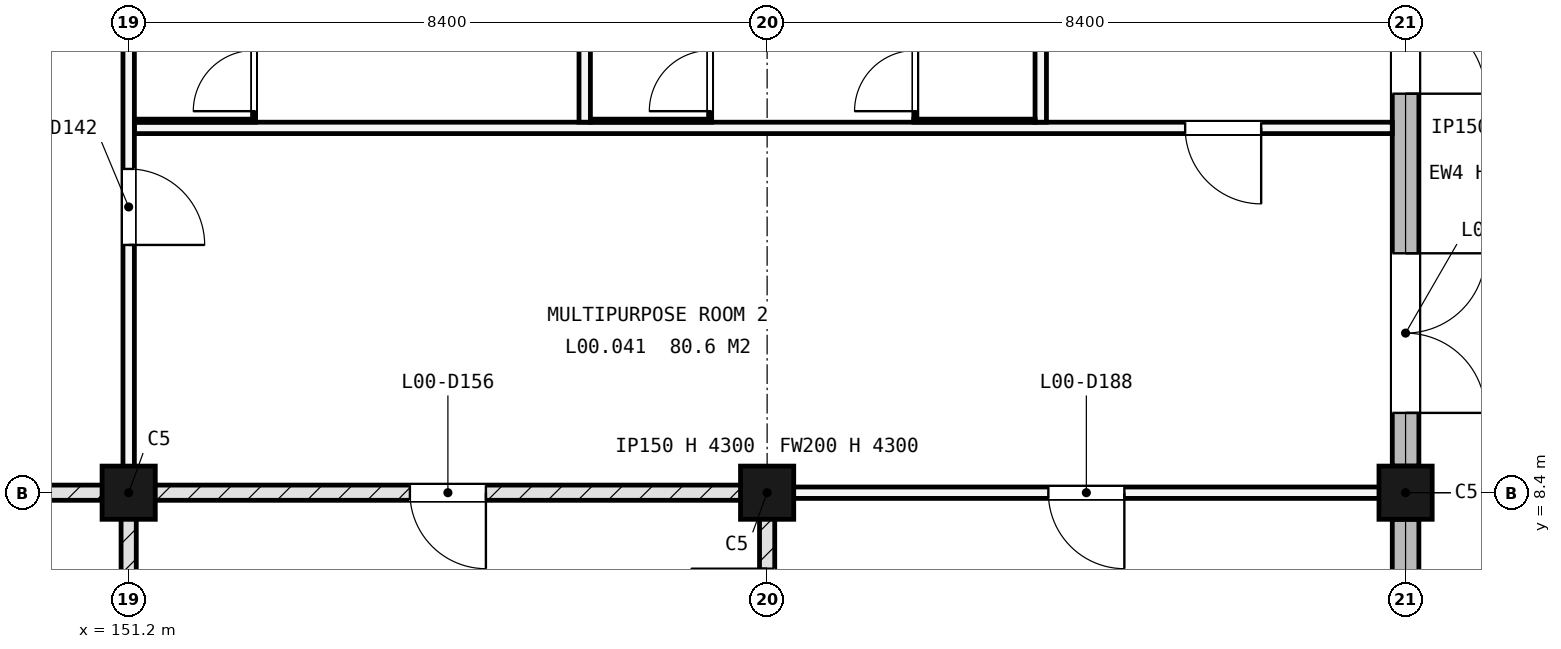
"""IFC4 building model, lengths in metres.
Left out: names, types, materials, properties, quantities, classifications, styles, units other than length and angle.
Written with IfcOpenShell. Run it as: python <this file> out.ifc"""

import sys

from ifc_helpers import new_model, si_unit, direction, frame, frame_2d, origin, origin_2d, place, context, subcontext, project, spatial, rectangle, extrude, element, fill, save


model = new_model("IFC4")
c1 = context("Model", 3, precision=1e-05, world=origin(), true_north=direction((0.0, 1.0)))
c2 = subcontext(c1, "Body", "Model", "MODEL_VIEW")
j1 = project(units=[si_unit("LENGTHUNIT", "METRE"), si_unit("PLANEANGLEUNIT", "RADIAN")], contexts=[c1])
p1 = place(None, origin())
s1 = spatial("IfcSite", under=j1, at=p1, CompositionType="ELEMENT")
p2 = place(p1, origin())
s2 = spatial("IfcBuilding", under=s1, at=p2, CompositionType="ELEMENT")
p3 = place(p2, origin())
s3 = spatial("IfcBuildingStorey", under=s2, at=p3, CompositionType="ELEMENT", Elevation=0.0)
for number, where, z_axis, x_axis in (
    (1, (151.2, 8.4, -0.3), (0.0, 0.0, 1.0), (1.0, 0.0, 0.0)),
    (2, (159.6, 8.4, -0.3), (0.0, 0.0, 1.0), (1.0, 0.0, 0.0)),
    (3, (168.0, 8.4, -0.3), (0.0, 0.0, 1.0), (1.0, 0.0, 0.0)),
):
    element("IfcColumn", number, at=place(p3, frame(where, z_axis=z_axis, x_axis=x_axis)), inside=s3, PredefinedType="COLUMN", context=c2, shape_type="SweptSolid", body=[
        extrude(rectangle(XDim=0.7, YDim=0.7, at=origin_2d()), origin(), (0.0, 0.0, 1.0), 5.4),
    ])
p4 = place(p3, frame((168.0, 0.225, 0.0), z_axis=(0.0, 0.0, 1.0), x_axis=(0.0, 1.0, 0.0)))
e4 = element("IfcWall", 4, at=p4, inside=s3, PredefinedType="STANDARD", context=c2, shape_type="SweptSolid", body=[
    extrude(rectangle(XDim=7.825, YDim=0.35, at=frame_2d((3.913, 0.0))), origin(), (0.0, 0.0, 1.0), 5.1),
])
p5 = place(p4, frame((4.875, 0.0, 0.0), z_axis=(0.0, 0.0, 1.0), x_axis=(-1.0, 0.0, 0.0)))
e5 = element("IfcOpeningElement", 5, at=p5, cuts=e4, PredefinedType="OPENING", context=c2, shape_type="SweptSolid", body=[
    extrude(rectangle(XDim=2.4, YDim=2.2, at=frame_2d((1.2, 1.1))), frame((0.0, 0.185, 0.0), z_axis=(0.0, -1.0, 0.0), x_axis=(1.0, 0.0, 0.0)), (0.0, 0.0, 1.0), 0.37),
])
p6 = place(p3, frame((168.0, 8.75, 0.0), z_axis=(0.0, 0.0, 1.0), x_axis=(0.0, 1.0, 0.0)))
e6 = element("IfcWall", 6, at=p6, inside=s3, PredefinedType="STANDARD", context=c2, shape_type="SweptSolid", body=[
    extrude(rectangle(XDim=7.7, YDim=0.35, at=frame_2d((3.85, 0.0))), origin(), (0.0, 0.0, 1.0), 4.45),
])
p7 = place(p6, frame((2.8, 0.0, 0.0), z_axis=(0.0, 0.0, 1.0), x_axis=(-1.0, 0.0, 0.0)))
e7 = element("IfcOpeningElement", 7, at=p7, cuts=e6, PredefinedType="OPENING", context=c2, shape_type="SweptSolid", body=[
    extrude(rectangle(XDim=2.1, YDim=2.2, at=frame_2d((1.05, 1.1))), frame((0.0, 0.185, 0.0), z_axis=(0.0, -1.0, 0.0), x_axis=(1.0, 0.0, 0.0)), (0.0, 0.0, 1.0), 0.37),
])
p8 = place(p6, frame((7.0, 0.0, 0.0), z_axis=(0.0, 0.0, 1.0), x_axis=(-1.0, 0.0, 0.0)))
e8 = element("IfcOpeningElement", 8, at=p8, cuts=e6, PredefinedType="OPENING", context=c2, shape_type="SweptSolid", body=[
    extrude(rectangle(XDim=2.1, YDim=2.2, at=frame_2d((1.05, 1.1))), frame((0.0, 0.185, 0.0), z_axis=(0.0, -1.0, 0.0), x_axis=(1.0, 0.0, 0.0)), (0.0, 0.0, 1.0), 0.37),
])
p9 = place(p3, frame((117.6, 8.4, 0.0), z_axis=(0.0, 0.0, 1.0), x_axis=(1.0, 0.0, 0.0)))
e9 = element("IfcWall", 9, at=p9, inside=s3, PredefinedType="SOLIDWALL", context=c2, shape_type="SweptSolid", body=[
    extrude(rectangle(XDim=42.0, YDim=0.2, at=frame_2d((21.0, 0.0))), origin(), (0.0, 0.0, 1.0), 4.3),
])
p10 = place(p9, frame((37.3, 0.0, 0.0)))
e10 = element("IfcOpeningElement", 10, at=p10, cuts=e9, PredefinedType="OPENING", context=c2, shape_type="SweptSolid", body=[
    extrude(rectangle(XDim=1.0, YDim=2.1, at=frame_2d((0.5, 1.05))), frame((0.0, 0.11, 0.0), z_axis=(0.0, -1.0, 0.0), x_axis=(1.0, 0.0, 0.0)), (0.0, 0.0, 1.0), 0.22),
])
p11 = place(p3, frame((159.6, 8.4, 0.0), z_axis=(0.0, 0.0, 1.0), x_axis=(1.0, 0.0, 0.0)))
e11 = element("IfcWall", 11, at=p11, inside=s3, PredefinedType="PARTITIONING", context=c2, shape_type="SweptSolid", body=[
    extrude(rectangle(XDim=8.4, YDim=0.15, at=frame_2d((4.2, 0.0))), origin(), (0.0, 0.0, 1.0), 4.3),
])
p12 = place(p11, frame((3.7, 0.0, 0.0)))
e12 = element("IfcOpeningElement", 12, at=p12, cuts=e11, PredefinedType="OPENING", context=c2, shape_type="SweptSolid", body=[
    extrude(rectangle(XDim=1.0, YDim=2.1, at=frame_2d((0.5, 1.05))), frame((0.0, 0.085, 0.0), z_axis=(0.0, -1.0, 0.0), x_axis=(1.0, 0.0, 0.0)), (0.0, 0.0, 1.0), 0.17),
])
p13 = place(p3, frame((151.275, 13.2, 0.0), z_axis=(0.0, 0.0, 1.0), x_axis=(1.0, 0.0, 0.0)))
e13 = element("IfcWall", 13, at=p13, inside=s3, PredefinedType="PARTITIONING", context=c2, shape_type="SweptSolid", body=[
    extrude(rectangle(XDim=16.55, YDim=0.15, at=frame_2d((8.275, 0.0))), origin(), (0.0, 0.0, 1.0), 5.1),
])
p14 = place(p13, frame((13.825, 0.0, 0.0)))
e14 = element("IfcOpeningElement", 14, at=p14, cuts=e13, PredefinedType="OPENING", context=c2, shape_type="SweptSolid", body=[
    extrude(rectangle(XDim=1.0, YDim=2.1, at=frame_2d((0.5, 1.05))), frame((0.0, 0.085, 0.0), z_axis=(0.0, -1.0, 0.0), x_axis=(1.0, 0.0, 0.0)), (0.0, 0.0, 1.0), 0.17),
])
p15 = place(p3, frame((151.2, 0.225, 0.0), z_axis=(0.0, 0.0, 1.0), x_axis=(0.0, 1.0, 0.0)))
e15 = element("IfcWall", 15, at=p15, inside=s3, PredefinedType="SOLIDWALL", context=c2, shape_type="SweptSolid", body=[
    extrude(rectangle(XDim=8.075, YDim=0.2, at=frame_2d((4.038, 0.0))), origin(), (0.0, 0.0, 1.0), 4.3),
])
p16 = place(p15, frame((3.325, 0.0, 0.0)))
e16 = element("IfcOpeningElement", 16, at=p16, cuts=e15, PredefinedType="OPENING", context=c2, shape_type="SweptSolid", body=[
    extrude(rectangle(XDim=1.3, YDim=2.1, at=frame_2d((0.65, 1.05))), frame((0.0, 0.11, 0.0), z_axis=(0.0, -1.0, 0.0), x_axis=(1.0, 0.0, 0.0)), (0.0, 0.0, 1.0), 0.22),
])
p17 = place(p3, frame((151.2, 8.5, 0.0), z_axis=(0.0, 0.0, 1.0), x_axis=(0.0, 1.0, 0.0)))
e17 = element("IfcWall", 17, at=p17, inside=s3, PredefinedType="PARTITIONING", context=c2, shape_type="SweptSolid", body=[
    extrude(rectangle(XDim=16.625, YDim=0.15, at=frame_2d((8.312, 0.0))), origin(), (0.0, 0.0, 1.0), 4.3),
])
p18 = place(p17, frame((3.16, 0.0, 0.0)))
e18 = element("IfcOpeningElement", 18, at=p18, cuts=e17, PredefinedType="OPENING", context=c2, shape_type="SweptSolid", body=[
    extrude(rectangle(XDim=1.0, YDim=2.1, at=frame_2d((0.5, 1.05))), frame((0.0, 0.085, 0.0), z_axis=(0.0, -1.0, 0.0), x_axis=(1.0, 0.0, 0.0)), (0.0, 0.0, 1.0), 0.17),
])
p19 = place(p3, frame((157.2, 13.275, 0.0), z_axis=(0.0, 0.0, 1.0), x_axis=(0.0, 1.0, 0.0)))
e19 = element("IfcWall", 19, at=p19, inside=s3, PredefinedType="PARTITIONING", context=c2, shape_type="SweptSolid", body=[
    extrude(rectangle(XDim=9.45, YDim=0.15, at=frame_2d((4.725, 0.0))), origin(), (0.0, 0.0, 1.0), 5.1),
])
p20 = place(p3, frame((159.6, 5.3, 0.0), z_axis=(0.0, 0.0, 1.0), x_axis=(0.0, 1.0, 0.0)))
e20 = element("IfcWall", 20, at=p20, inside=s3, PredefinedType="SOLIDWALL", context=c2, shape_type="SweptSolid", body=[
    extrude(rectangle(XDim=3.0, YDim=0.2, at=frame_2d((1.5, 0.0))), origin(), (0.0, 0.0, 1.0), 5.1),
])
p21 = place(p20, frame((1.1, 0.0, 0.0)))
e21 = element("IfcOpeningElement", 21, at=p21, cuts=e20, PredefinedType="OPENING", context=c2, shape_type="SweptSolid", body=[
    extrude(rectangle(XDim=1.0, YDim=2.1, at=frame_2d((0.5, 1.05))), frame((0.0, 0.11, 0.0), z_axis=(0.0, -1.0, 0.0), x_axis=(1.0, 0.0, 0.0)), (0.0, 0.0, 1.0), 0.22),
])
p22 = place(p3, frame((163.2, 13.275, 0.0), z_axis=(0.0, 0.0, 1.0), x_axis=(0.0, 1.0, 0.0)))
e22 = element("IfcWall", 22, at=p22, inside=s3, PredefinedType="PARTITIONING", context=c2, shape_type="SweptSolid", body=[
    extrude(rectangle(XDim=9.45, YDim=0.15, at=frame_2d((4.725, 0.0))), origin(), (0.0, 0.0, 1.0), 5.1),
])
p23 = place(p3, frame((151.275, 13.295, 0.0), z_axis=(0.0, 0.0, 1.0), x_axis=(1.0, 0.0, 0.0)))
e23 = element("IfcWall", 23, at=p23, inside=s3, PredefinedType="PARTITIONING", context=c2, shape_type="SweptSolid", body=[
    extrude(rectangle(XDim=1.595, YDim=0.04, at=frame_2d((0.798, 0.0))), origin(), (0.0, 0.0, 1.0), 2.0),
])
p24 = place(p3, frame((152.85, 13.315, 0.0), z_axis=(0.0, 0.0, 1.0), x_axis=(0.0, 1.0, 0.0)))
e24 = element("IfcWall", 24, at=p24, inside=s3, PredefinedType="PARTITIONING", context=c2, shape_type="SweptSolid", body=[
    extrude(rectangle(XDim=0.955, YDim=0.04, at=frame_2d((0.478, 0.0))), origin(), (0.0, 0.0, 1.0), 2.0),
])
p25 = place(p24, frame((0.105, 0.0, 0.0)))
e25 = element("IfcOpeningElement", 25, at=p25, cuts=e24, PredefinedType="OPENING", context=c2, shape_type="SweptSolid", body=[
    extrude(rectangle(XDim=0.8, YDim=2.0, at=frame_2d((0.4, 1.0))), frame((0.0, 0.03, 0.0), z_axis=(0.0, -1.0, 0.0), x_axis=(1.0, 0.0, 0.0)), (0.0, 0.0, 1.0), 0.06),
])
p26 = place(p3, frame((157.275, 13.295, 0.0), z_axis=(0.0, 0.0, 1.0), x_axis=(1.0, 0.0, 0.0)))
e26 = element("IfcWall", 26, at=p26, inside=s3, PredefinedType="PARTITIONING", context=c2, shape_type="SweptSolid", body=[
    extrude(rectangle(XDim=1.595, YDim=0.04, at=frame_2d((0.798, 0.0))), origin(), (0.0, 0.0, 1.0), 2.0),
])
p27 = place(p3, frame((158.85, 13.315, 0.0), z_axis=(0.0, 0.0, 1.0), x_axis=(0.0, 1.0, 0.0)))
e27 = element("IfcWall", 27, at=p27, inside=s3, PredefinedType="PARTITIONING", context=c2, shape_type="SweptSolid", body=[
    extrude(rectangle(XDim=0.955, YDim=0.04, at=frame_2d((0.478, 0.0))), origin(), (0.0, 0.0, 1.0), 2.0),
])
p28 = place(p27, frame((0.105, 0.0, 0.0)))
e28 = element("IfcOpeningElement", 28, at=p28, cuts=e27, PredefinedType="OPENING", context=c2, shape_type="SweptSolid", body=[
    extrude(rectangle(XDim=0.8, YDim=2.0, at=frame_2d((0.4, 1.0))), frame((0.0, 0.03, 0.0), z_axis=(0.0, -1.0, 0.0), x_axis=(1.0, 0.0, 0.0)), (0.0, 0.0, 1.0), 0.06),
])
p29 = place(p3, frame((163.125, 13.295, 0.0), z_axis=(0.0, 0.0, 1.0), x_axis=(-1.0, 0.0, 0.0)))
e29 = element("IfcWall", 29, at=p29, inside=s3, PredefinedType="PARTITIONING", context=c2, shape_type="SweptSolid", body=[
    extrude(rectangle(XDim=1.595, YDim=0.04, at=frame_2d((0.797, 0.0))), origin(), (0.0, 0.0, 1.0), 2.0),
])
p30 = place(p3, frame((161.55, 13.315, 0.0), z_axis=(0.0, 0.0, 1.0), x_axis=(0.0, 1.0, 0.0)))
e30 = element("IfcWall", 30, at=p30, inside=s3, PredefinedType="PARTITIONING", context=c2, shape_type="SweptSolid", body=[
    extrude(rectangle(XDim=0.955, YDim=0.04, at=frame_2d((0.478, 0.0))), origin(), (0.0, 0.0, 1.0), 2.0),
])
p31 = place(p30, frame((0.105, 0.0, 0.0)))
e31 = element("IfcOpeningElement", 31, at=p31, cuts=e30, PredefinedType="OPENING", context=c2, shape_type="SweptSolid", body=[
    extrude(rectangle(XDim=0.8, YDim=2.0, at=frame_2d((0.4, 1.0))), frame((0.0, 0.03, 0.0), z_axis=(0.0, -1.0, 0.0), x_axis=(1.0, 0.0, 0.0)), (0.0, 0.0, 1.0), 0.06),
])
p32 = place(p7, origin())
e32 = element("IfcDoor", 32, at=p32, inside=s3, OperationType="SINGLE_SWING_LEFT", PredefinedType="DOOR", context=c2, shape_type="SweptSolid", body=[
    extrude(rectangle(XDim=2.1, YDim=0.013, at=frame_2d((1.05, 0.007))), frame((0.0, 0.115, 0.0), z_axis=(0.0, -1.0, 0.0), x_axis=(1.0, 0.0, 0.0)), (0.0, 0.0, 1.0), 0.23),
    extrude(rectangle(XDim=0.075, YDim=2.112, at=frame_2d((0.038, 1.069))), frame((0.0, 0.125, 0.0), z_axis=(0.0, -1.0, 0.0), x_axis=(1.0, 0.0, 0.0)), (0.0, 0.0, 1.0), 0.25),
    extrude(rectangle(XDim=0.075, YDim=2.112, at=frame_2d((2.062, 1.069))), frame((0.0, 0.125, 0.0), z_axis=(0.0, -1.0, 0.0), x_axis=(1.0, 0.0, 0.0)), (0.0, 0.0, 1.0), 0.25),
    extrude(rectangle(XDim=2.1, YDim=0.075, at=frame_2d((1.05, 2.163))), frame((0.0, 0.115, 0.0), z_axis=(0.0, -1.0, 0.0), x_axis=(1.0, 0.0, 0.0)), (0.0, 0.0, 1.0), 0.23),
    extrude(rectangle(XDim=1.95, YDim=0.3, at=frame_2d((1.05, 0.163))), frame((0.0, 0.02, 0.0), z_axis=(0.0, -1.0, 0.0), x_axis=(1.0, 0.0, 0.0)), (0.0, 0.0, 1.0), 0.04),
    extrude(rectangle(XDim=1.95, YDim=0.12, at=frame_2d((1.05, 2.065))), frame((0.0, 0.02, 0.0), z_axis=(0.0, -1.0, 0.0), x_axis=(1.0, 0.0, 0.0)), (0.0, 0.0, 1.0), 0.04),
    extrude(rectangle(XDim=0.09, YDim=1.692, at=frame_2d((0.12, 1.159))), frame((0.0, 0.025, 0.0), z_axis=(0.0, -1.0, 0.0), x_axis=(1.0, 0.0, 0.0)), (0.0, 0.0, 1.0), 0.05),
    extrude(rectangle(XDim=0.18, YDim=1.692, at=frame_2d((1.05, 1.159))), frame((0.0, 0.025, 0.0), z_axis=(0.0, -1.0, 0.0), x_axis=(1.0, 0.0, 0.0)), (0.0, 0.0, 1.0), 0.05),
    extrude(rectangle(XDim=0.09, YDim=1.692, at=frame_2d((1.98, 1.159))), frame((0.0, 0.025, 0.0), z_axis=(0.0, -1.0, 0.0), x_axis=(1.0, 0.0, 0.0)), (0.0, 0.0, 1.0), 0.05),
    extrude(rectangle(XDim=0.795, YDim=1.692, at=frame_2d((0.562, 1.159))), frame((0.0, 0.012, 0.0), z_axis=(0.0, -1.0, 0.0), x_axis=(1.0, 0.0, 0.0)), (0.0, 0.0, 1.0), 0.024),
    extrude(rectangle(XDim=0.795, YDim=1.692, at=frame_2d((1.538, 1.159))), frame((0.0, 0.012, 0.0), z_axis=(0.0, -1.0, 0.0), x_axis=(1.0, 0.0, 0.0)), (0.0, 0.0, 1.0), 0.024),
])
fill(e7, e32)
p33 = place(p8, origin())
e33 = element("IfcDoor", 33, at=p33, inside=s3, OperationType="SINGLE_SWING_LEFT", PredefinedType="DOOR", context=c2, shape_type="SweptSolid", body=[
    extrude(rectangle(XDim=2.1, YDim=0.013, at=frame_2d((1.05, 0.007))), frame((0.0, 0.115, 0.0), z_axis=(0.0, -1.0, 0.0), x_axis=(1.0, 0.0, 0.0)), (0.0, 0.0, 1.0), 0.23),
    extrude(rectangle(XDim=0.075, YDim=2.112, at=frame_2d((0.038, 1.069))), frame((0.0, 0.125, 0.0), z_axis=(0.0, -1.0, 0.0), x_axis=(1.0, 0.0, 0.0)), (0.0, 0.0, 1.0), 0.25),
    extrude(rectangle(XDim=0.075, YDim=2.112, at=frame_2d((2.062, 1.069))), frame((0.0, 0.125, 0.0), z_axis=(0.0, -1.0, 0.0), x_axis=(1.0, 0.0, 0.0)), (0.0, 0.0, 1.0), 0.25),
    extrude(rectangle(XDim=2.1, YDim=0.075, at=frame_2d((1.05, 2.163))), frame((0.0, 0.115, 0.0), z_axis=(0.0, -1.0, 0.0), x_axis=(1.0, 0.0, 0.0)), (0.0, 0.0, 1.0), 0.23),
    extrude(rectangle(XDim=1.95, YDim=0.3, at=frame_2d((1.05, 0.163))), frame((0.0, 0.02, 0.0), z_axis=(0.0, -1.0, 0.0), x_axis=(1.0, 0.0, 0.0)), (0.0, 0.0, 1.0), 0.04),
    extrude(rectangle(XDim=1.95, YDim=0.12, at=frame_2d((1.05, 2.065))), frame((0.0, 0.02, 0.0), z_axis=(0.0, -1.0, 0.0), x_axis=(1.0, 0.0, 0.0)), (0.0, 0.0, 1.0), 0.04),
    extrude(rectangle(XDim=0.09, YDim=1.692, at=frame_2d((0.12, 1.159))), frame((0.0, 0.025, 0.0), z_axis=(0.0, -1.0, 0.0), x_axis=(1.0, 0.0, 0.0)), (0.0, 0.0, 1.0), 0.05),
    extrude(rectangle(XDim=0.18, YDim=1.692, at=frame_2d((1.05, 1.159))), frame((0.0, 0.025, 0.0), z_axis=(0.0, -1.0, 0.0), x_axis=(1.0, 0.0, 0.0)), (0.0, 0.0, 1.0), 0.05),
    extrude(rectangle(XDim=0.09, YDim=1.692, at=frame_2d((1.98, 1.159))), frame((0.0, 0.025, 0.0), z_axis=(0.0, -1.0, 0.0), x_axis=(1.0, 0.0, 0.0)), (0.0, 0.0, 1.0), 0.05),
    extrude(rectangle(XDim=0.795, YDim=1.692, at=frame_2d((0.562, 1.159))), frame((0.0, 0.012, 0.0), z_axis=(0.0, -1.0, 0.0), x_axis=(1.0, 0.0, 0.0)), (0.0, 0.0, 1.0), 0.024),
    extrude(rectangle(XDim=0.795, YDim=1.692, at=frame_2d((1.538, 1.159))), frame((0.0, 0.012, 0.0), z_axis=(0.0, -1.0, 0.0), x_axis=(1.0, 0.0, 0.0)), (0.0, 0.0, 1.0), 0.024),
])
fill(e8, e33)
p34 = place(p21, origin())
e34 = element("IfcDoor", 34, at=p34, inside=s3, OperationType="SINGLE_SWING_LEFT", PredefinedType="DOOR", context=c2, shape_type="SweptSolid", body=[
    extrude(rectangle(XDim=1.0, YDim=2.1, at=frame_2d((0.5, 1.05))), frame((0.0, 0.025, 0.0), z_axis=(0.0, -1.0, 0.0), x_axis=(1.0, 0.0, 0.0)), (0.0, 0.0, 1.0), 0.05),
])
fill(e21, e34)
p35 = place(p10, origin())
e35 = element("IfcDoor", 35, at=p35, inside=s3, OperationType="SINGLE_SWING_RIGHT", PredefinedType="DOOR", context=c2, shape_type="SweptSolid", body=[
    extrude(rectangle(XDim=1.0, YDim=2.1, at=frame_2d((0.5, 1.05))), frame((0.0, 0.025, 0.0), z_axis=(0.0, -1.0, 0.0), x_axis=(1.0, 0.0, 0.0)), (0.0, 0.0, 1.0), 0.05),
])
fill(e10, e35)
p36 = place(p12, origin())
e36 = element("IfcDoor", 36, at=p36, inside=s3, OperationType="SINGLE_SWING_RIGHT", PredefinedType="DOOR", context=c2, shape_type="SweptSolid", body=[
    extrude(rectangle(XDim=1.0, YDim=2.1, at=frame_2d((0.5, 1.05))), frame((0.0, 0.025, 0.0), z_axis=(0.0, -1.0, 0.0), x_axis=(1.0, 0.0, 0.0)), (0.0, 0.0, 1.0), 0.05),
])
fill(e12, e36)
p37 = place(p14, origin())
e37 = element("IfcDoor", 37, at=p37, inside=s3, OperationType="SINGLE_SWING_RIGHT", PredefinedType="DOOR", context=c2, shape_type="SweptSolid", body=[
    extrude(rectangle(XDim=1.0, YDim=2.1, at=frame_2d((0.5, 1.05))), frame((0.0, 0.025, 0.0), z_axis=(0.0, -1.0, 0.0), x_axis=(1.0, 0.0, 0.0)), (0.0, 0.0, 1.0), 0.05),
])
fill(e14, e37)
p38 = place(p18, origin())
e38 = element("IfcDoor", 38, at=p38, inside=s3, OperationType="SINGLE_SWING_LEFT", PredefinedType="DOOR", context=c2, shape_type="SweptSolid", body=[
    extrude(rectangle(XDim=1.0, YDim=2.1, at=frame_2d((0.5, 1.05))), frame((0.0, 0.025, 0.0), z_axis=(0.0, -1.0, 0.0), x_axis=(1.0, 0.0, 0.0)), (0.0, 0.0, 1.0), 0.05),
])
fill(e18, e38)
p39 = place(p25, origin())
e39 = element("IfcDoor", 39, at=p39, inside=s3, OperationType="SINGLE_SWING_LEFT", PredefinedType="DOOR", context=c2, shape_type="SweptSolid", body=[
    extrude(rectangle(XDim=0.8, YDim=2.0, at=frame_2d((0.4, 1.0))), frame((0.0, 0.02, 0.0), z_axis=(0.0, -1.0, 0.0), x_axis=(1.0, 0.0, 0.0)), (0.0, 0.0, 1.0), 0.04),
])
fill(e25, e39)
p40 = place(p28, origin())
e40 = element("IfcDoor", 40, at=p40, inside=s3, OperationType="SINGLE_SWING_LEFT", PredefinedType="DOOR", context=c2, shape_type="SweptSolid", body=[
    extrude(rectangle(XDim=0.8, YDim=2.0, at=frame_2d((0.4, 1.0))), frame((0.0, 0.02, 0.0), z_axis=(0.0, -1.0, 0.0), x_axis=(1.0, 0.0, 0.0)), (0.0, 0.0, 1.0), 0.04),
])
fill(e28, e40)
p41 = place(p31, origin())
e41 = element("IfcDoor", 41, at=p41, inside=s3, OperationType="SINGLE_SWING_LEFT", PredefinedType="DOOR", context=c2, shape_type="SweptSolid", body=[
    extrude(rectangle(XDim=0.8, YDim=2.0, at=frame_2d((0.4, 1.0))), frame((0.0, 0.02, 0.0), z_axis=(0.0, -1.0, 0.0), x_axis=(1.0, 0.0, 0.0)), (0.0, 0.0, 1.0), 0.04),
])
fill(e31, e41)
save(model, sys.argv[1])
